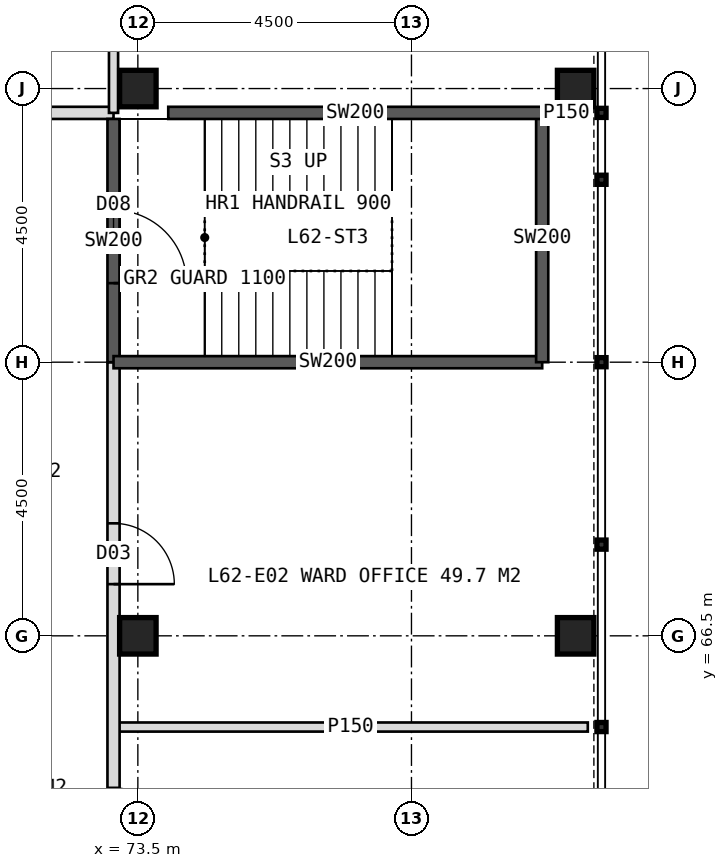
"""IFC4 building model, lengths in metres.
Left out: names, types, materials, properties, quantities, classifications, styles, units other than length and angle.
Written with IfcOpenShell. Run it as: python <this file> out.ifc"""

import sys

from ifc_helpers import new_model, si_unit, direction, frame, frame_2d, origin, origin_2d, place, context, subcontext, project, spatial, rectangle, hollow_rectangle, extrude, element, fill, save


model = new_model("IFC4")
c1 = context("Model", 3, precision=1e-05, world=origin(), true_north=direction((0.0, 1.0)))
c2 = subcontext(c1, "Body", "Model", "MODEL_VIEW")
j1 = project(units=[si_unit("LENGTHUNIT", "METRE"), si_unit("PLANEANGLEUNIT", "RADIAN")], contexts=[c1])
p1 = place(None, origin())
s1 = spatial("IfcSite", under=j1, at=p1, CompositionType="ELEMENT")
p2 = place(p1, origin())
s2 = spatial("IfcBuilding", under=s1, at=p2, CompositionType="ELEMENT")
p3 = place(p2, frame((0.0, 0.0, 258.0)))
s3 = spatial("IfcBuildingStorey", under=s2, at=p3, CompositionType="ELEMENT", Elevation=258.0)
for number, where, z_axis, x_axis in (
    (1, (73.5, 75.5, 0.0), (0.0, 0.0, 1.0), (1.0, 0.0, 0.0)),
    (2, (73.5, 66.5, 0.0), (0.0, 0.0, 1.0), (1.0, 0.0, 0.0)),
    (3, (80.7, 66.5, 0.0), (0.0, 0.0, 1.0), (1.0, 0.0, 0.0)),
    (4, (80.7, 75.5, 0.0), (0.0, 0.0, 1.0), (1.0, 0.0, 0.0)),
):
    element("IfcColumn", number, at=place(p3, frame(where, z_axis=z_axis, x_axis=x_axis)), inside=s3, PredefinedType="COLUMN", context=c2, shape_type="SweptSolid", body=[
        extrude(hollow_rectangle(XDim=0.6, YDim=0.6, WallThickness=0.04, at=origin_2d()), origin(), (0.0, 0.0, 1.0), 4.0),
    ])
p4 = place(p3, frame((46.9, 75.1, 0.0), z_axis=(0.0, 0.0, 1.0), x_axis=(1.0, 0.0, 0.0)))
e5 = element("IfcWall", 5, at=p4, inside=s3, PredefinedType="PARTITIONING", context=c2, shape_type="SweptSolid", body=[
    extrude(rectangle(XDim=26.2, YDim=0.2, at=frame_2d((13.1, 0.0))), origin(), (0.0, 0.0, 1.0), 3.75),
])
p5 = place(p4, frame((1.75, 0.0, 0.0)))
e6 = element("IfcOpeningElement", 6, at=p5, cuts=e5, PredefinedType="OPENING", context=c2, shape_type="SweptSolid", body=[
    extrude(rectangle(XDim=1.2, YDim=2.2, at=frame_2d((0.6, 1.1))), frame((0.0, 0.11, 0.0), z_axis=(0.0, -1.0, 0.0), x_axis=(1.0, 0.0, 0.0)), (0.0, 0.0, 1.0), 0.22),
])
p6 = place(p4, frame((6.75, 0.0, 0.0)))
e7 = element("IfcOpeningElement", 7, at=p6, cuts=e5, PredefinedType="OPENING", context=c2, shape_type="SweptSolid", body=[
    extrude(rectangle(XDim=1.0, YDim=2.1, at=frame_2d((0.5, 1.05))), frame((0.0, 0.11, 0.0), z_axis=(0.0, -1.0, 0.0), x_axis=(1.0, 0.0, 0.0)), (0.0, 0.0, 1.0), 0.22),
])
p7 = place(p4, frame((12.75, 0.0, 0.0)))
e8 = element("IfcOpeningElement", 8, at=p7, cuts=e5, PredefinedType="OPENING", context=c2, shape_type="SweptSolid", body=[
    extrude(rectangle(XDim=1.2, YDim=2.2, at=frame_2d((0.6, 1.1))), frame((0.0, 0.11, 0.0), z_axis=(0.0, -1.0, 0.0), x_axis=(1.0, 0.0, 0.0)), (0.0, 0.0, 1.0), 0.22),
])
p8 = place(p4, frame((20.45, 0.0, 0.0)))
e9 = element("IfcOpeningElement", 9, at=p8, cuts=e5, PredefinedType="OPENING", context=c2, shape_type="SweptSolid", body=[
    extrude(rectangle(XDim=0.9, YDim=2.1, at=frame_2d((0.45, 1.05))), frame((0.0, 0.11, 0.0), z_axis=(0.0, -1.0, 0.0), x_axis=(1.0, 0.0, 0.0)), (0.0, 0.0, 1.0), 0.22),
])
p9 = place(p4, frame((18.45, 0.0, 0.0)))
e10 = element("IfcOpeningElement", 10, at=p9, cuts=e5, PredefinedType="OPENING", context=c2, shape_type="SweptSolid", body=[
    extrude(rectangle(XDim=1.0, YDim=2.1, at=frame_2d((0.5, 1.05))), frame((0.0, 0.11, 0.0), z_axis=(0.0, -1.0, 0.0), x_axis=(1.0, 0.0, 0.0)), (0.0, 0.0, 1.0), 0.22),
])
p10 = place(p4, frame((23.65, 0.0, 0.0)))
e11 = element("IfcOpeningElement", 11, at=p10, cuts=e5, PredefinedType="OPENING", context=c2, shape_type="SweptSolid", body=[
    extrude(rectangle(XDim=1.0, YDim=2.1, at=frame_2d((0.5, 1.05))), frame((0.0, 0.11, 0.0), z_axis=(0.0, -1.0, 0.0), x_axis=(1.0, 0.0, 0.0)), (0.0, 0.0, 1.0), 0.22),
])
p11 = place(p3, frame((73.1, 75.1, 0.0), z_axis=(0.0, 0.0, 1.0), x_axis=(0.0, 1.0, 0.0)))
e12 = element("IfcWall", 12, at=p11, inside=s3, PredefinedType="PARTITIONING", context=c2, shape_type="SweptSolid", body=[
    extrude(rectangle(XDim=7.8, YDim=0.15, at=frame_2d((3.9, 0.0))), origin(), (0.0, 0.0, 1.0), 3.75),
])
p12 = place(p11, frame((2.7, 0.0, 0.0)))
e13 = element("IfcOpeningElement", 13, at=p12, cuts=e12, PredefinedType="OPENING", context=c2, shape_type="SweptSolid", body=[
    extrude(rectangle(XDim=1.0, YDim=2.1, at=frame_2d((0.5, 1.05))), frame((0.0, 0.085, 0.0), z_axis=(0.0, -1.0, 0.0), x_axis=(1.0, 0.0, 0.0)), (0.0, 0.0, 1.0), 0.17),
])
p13 = place(p3, frame((73.1, 65.0, 0.0), z_axis=(0.0, 0.0, 1.0), x_axis=(1.0, 0.0, 0.0)))
e14 = element("IfcWall", 14, at=p13, inside=s3, PredefinedType="PARTITIONING", context=c2, shape_type="SweptSolid", body=[
    extrude(rectangle(XDim=7.8, YDim=0.15, at=frame_2d((3.9, 0.0))), origin(), (0.0, 0.0, 1.0), 3.75),
])
p14 = place(p3, frame((73.1, 71.0, 0.0), z_axis=(0.0, 0.0, 1.0), x_axis=(0.0, -1.0, 0.0)))
e15 = element("IfcWall", 15, at=p14, inside=s3, PredefinedType="PARTITIONING", context=c2, shape_type="SweptSolid", body=[
    extrude(rectangle(XDim=22.1, YDim=0.2, at=frame_2d((11.05, 0.0))), origin(), (0.0, 0.0, 1.0), 3.75),
])
p15 = place(p14, frame((2.65, 0.0, 0.0)))
e16 = element("IfcOpeningElement", 16, at=p15, cuts=e15, PredefinedType="OPENING", context=c2, shape_type="SweptSolid", body=[
    extrude(rectangle(XDim=1.0, YDim=2.1, at=frame_2d((0.5, 1.05))), frame((0.0, 0.11, 0.0), z_axis=(0.0, -1.0, 0.0), x_axis=(1.0, 0.0, 0.0)), (0.0, 0.0, 1.0), 0.22),
])
p16 = place(p14, frame((7.0, 0.0, 0.0)))
e17 = element("IfcOpeningElement", 17, at=p16, cuts=e15, PredefinedType="OPENING", context=c2, shape_type="SweptSolid", body=[
    extrude(rectangle(XDim=1.0, YDim=2.1, at=frame_2d((0.5, 1.05))), frame((0.0, 0.11, 0.0), z_axis=(0.0, -1.0, 0.0), x_axis=(1.0, 0.0, 0.0)), (0.0, 0.0, 1.0), 0.22),
])
p17 = place(p14, frame((14.35, 0.0, 0.0)))
e18 = element("IfcOpeningElement", 18, at=p17, cuts=e15, PredefinedType="OPENING", context=c2, shape_type="SweptSolid", body=[
    extrude(rectangle(XDim=1.2, YDim=2.2, at=frame_2d((0.6, 1.1))), frame((0.0, 0.11, 0.0), z_axis=(0.0, -1.0, 0.0), x_axis=(1.0, 0.0, 0.0)), (0.0, 0.0, 1.0), 0.22),
])
p18 = place(p14, frame((19.15, 0.0, 0.0)))
e19 = element("IfcOpeningElement", 19, at=p18, cuts=e15, PredefinedType="OPENING", context=c2, shape_type="SweptSolid", body=[
    extrude(rectangle(XDim=1.2, YDim=2.2, at=frame_2d((0.6, 1.1))), frame((0.0, 0.11, 0.0), z_axis=(0.0, -1.0, 0.0), x_axis=(1.0, 0.0, 0.0)), (0.0, 0.0, 1.0), 0.22),
])
p19 = place(p3, frame((80.2, 75.1, 0.0), z_axis=(0.0, 0.0, 1.0), x_axis=(1.0, 0.0, 0.0)))
e20 = element("IfcWall", 20, at=p19, inside=s3, PredefinedType="PARTITIONING", context=c2, shape_type="SweptSolid", body=[
    extrude(rectangle(XDim=0.7, YDim=0.15, at=frame_2d((0.35, 0.0))), origin(), (0.0, 0.0, 1.0), 3.75),
])
p20 = place(p3, frame((73.1, 75.0, 0.0), z_axis=(0.0, 0.0, 1.0), x_axis=(0.0, -1.0, 0.0)))
e21 = element("IfcWall", 21, at=p20, inside=s3, PredefinedType="SOLIDWALL", context=c2, shape_type="SweptSolid", body=[
    extrude(rectangle(XDim=4.0, YDim=0.2, at=frame_2d((2.0, 0.0))), origin(), (0.0, 0.0, 1.0), 3.75),
])
p21 = place(p20, frame((1.5, 0.0, 0.0)))
e22 = element("IfcOpeningElement", 22, at=p21, cuts=e21, PredefinedType="OPENING", context=c2, shape_type="SweptSolid", body=[
    extrude(rectangle(XDim=1.2, YDim=2.1, at=frame_2d((0.6, 1.05))), frame((0.0, 0.11, 0.0), z_axis=(0.0, -1.0, 0.0), x_axis=(1.0, 0.0, 0.0)), (0.0, 0.0, 1.0), 0.22),
])
p22 = place(p3, frame((73.1, 71.0, 0.0), z_axis=(0.0, 0.0, 1.0), x_axis=(1.0, 0.0, 0.0)))
e23 = element("IfcWall", 23, at=p22, inside=s3, PredefinedType="SOLIDWALL", context=c2, shape_type="SweptSolid", body=[
    extrude(rectangle(XDim=7.05, YDim=0.2, at=frame_2d((3.525, 0.0))), origin(), (0.0, 0.0, 1.0), 3.75),
])
p23 = place(p3, frame((80.15, 71.0, 0.0), z_axis=(0.0, 0.0, 1.0), x_axis=(0.0, 1.0, 0.0)))
e24 = element("IfcWall", 24, at=p23, inside=s3, PredefinedType="SOLIDWALL", context=c2, shape_type="SweptSolid", body=[
    extrude(rectangle(XDim=4.1, YDim=0.2, at=frame_2d((2.05, 0.0))), origin(), (0.0, 0.0, 1.0), 3.75),
])
p24 = place(p3, frame((74.0, 75.1, 0.0), z_axis=(0.0, 0.0, 1.0), x_axis=(1.0, 0.0, 0.0)))
e25 = element("IfcWall", 25, at=p24, inside=s3, PredefinedType="SOLIDWALL", context=c2, shape_type="SweptSolid", body=[
    extrude(rectangle(XDim=6.15, YDim=0.2, at=frame_2d((3.075, 0.0))), origin(), (0.0, 0.0, 1.0), 3.75),
])
p25 = place(p15, origin())
e26 = element("IfcDoor", 26, at=p25, inside=s3, OperationType="SINGLE_SWING_RIGHT", PredefinedType="DOOR", context=c2, shape_type="SweptSolid", body=[
    extrude(rectangle(XDim=1.0, YDim=2.1, at=frame_2d((0.5, 1.05))), frame((0.0, 0.025, 0.0), z_axis=(0.0, -1.0, 0.0), x_axis=(1.0, 0.0, 0.0)), (0.0, 0.0, 1.0), 0.05),
])
fill(e16, e26)
p26 = place(p21, origin())
e27 = element("IfcDoor", 27, at=p26, inside=s3, OperationType="SINGLE_SWING_RIGHT", PredefinedType="DOOR", context=c2, shape_type="SweptSolid", body=[
    extrude(rectangle(XDim=1.2, YDim=2.1, at=frame_2d((0.6, 1.05))), frame((0.0, 0.025, 0.0), z_axis=(0.0, -1.0, 0.0), x_axis=(1.0, 0.0, 0.0)), (0.0, 0.0, 1.0), 0.05),
])
fill(e22, e27)
save(model, sys.argv[1])
